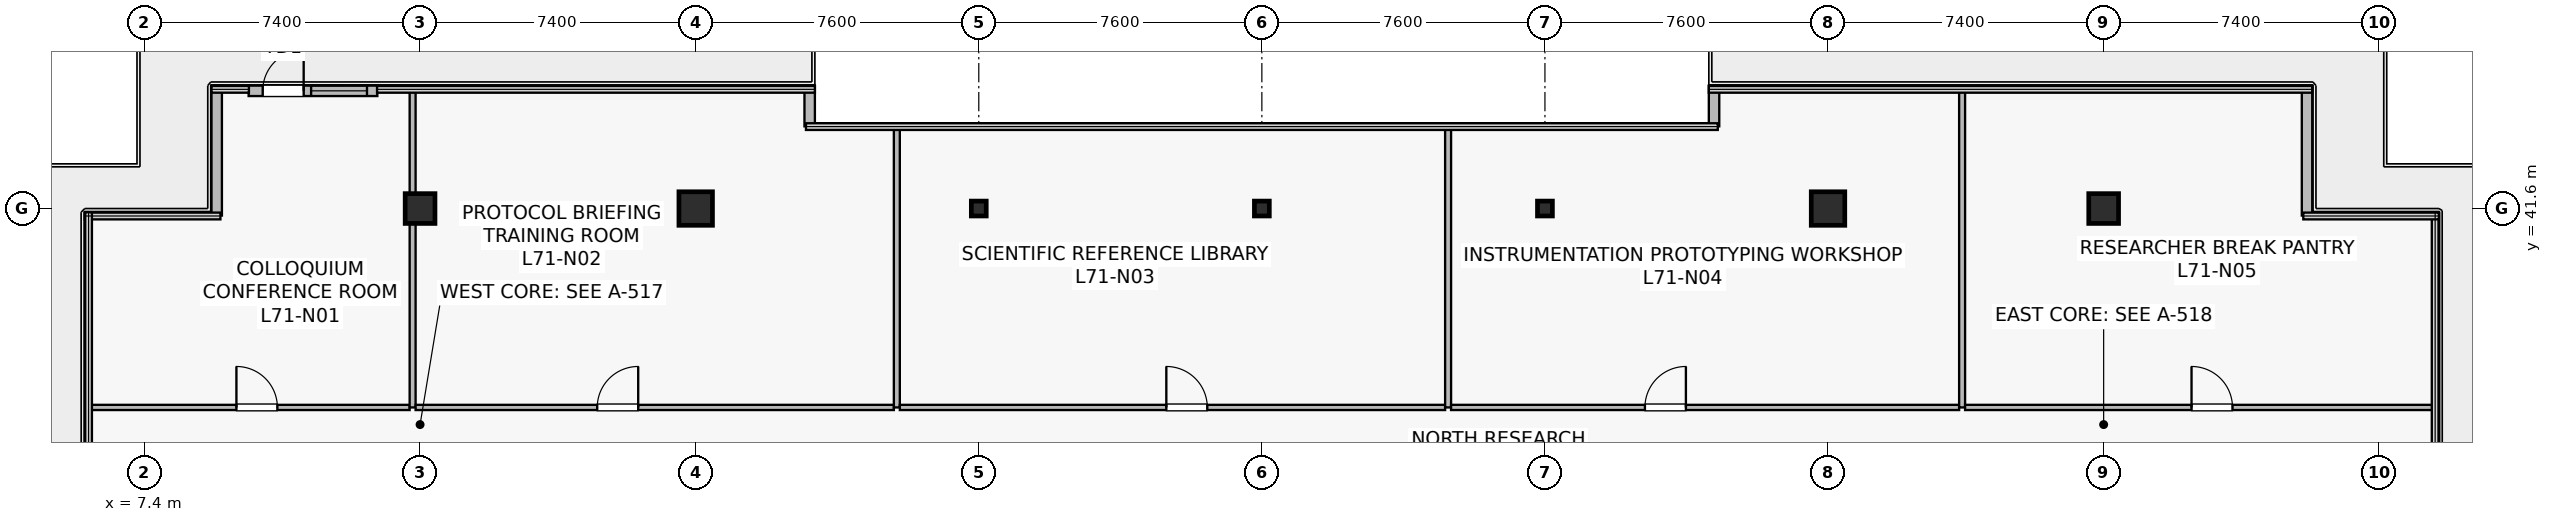
"""IFC4 building model, lengths in metres.
Left out: names, types, materials, properties, quantities, classifications, styles, units other than length and angle.
Written with IfcOpenShell. Run it as: python <this file> out.ifc"""

import sys

from ifc_helpers import new_model, si_unit, direction, frame, frame_2d, origin, origin_2d, place, context, subcontext, project, spatial, rectangle, i_section, extrude, source, transform, mapped, element, fill, save


model = new_model("IFC4")
c1 = context("Model", 3, precision=1e-05, world=origin(), true_north=direction((0.0, 1.0)))
c2 = subcontext(c1, "Body", "Model", "MODEL_VIEW")
j1 = project(units=[si_unit("LENGTHUNIT", "METRE"), si_unit("PLANEANGLEUNIT", "RADIAN")], contexts=[c1])
p1 = place(None, origin())
s1 = spatial("IfcSite", under=j1, at=p1, CompositionType="ELEMENT")
p2 = place(p1, origin())
s2 = spatial("IfcBuilding", under=s1, at=p2, CompositionType="ELEMENT")
p3 = place(p2, frame((0.0, 0.0, 297.6)))
s3 = spatial("IfcBuildingStorey", under=s2, at=p3, CompositionType="ELEMENT", Elevation=297.6)
m1 = source(origin(), c2, "Body", "SweptSolid", [
    extrude(rectangle(XDim=0.8, YDim=0.8, at=origin_2d()), origin(), (0.0, 0.0, 1.0), 4.2),
])
p4 = place(p3, frame((14.8, 41.6, 0.0), z_axis=(0.0, 0.0, 1.0), x_axis=(1.0, 0.0, 0.0)))
e1 = element("IfcColumn", 1, at=p4, inside=s3, PredefinedType="COLUMN", context=c2, shape_type="MappedRepresentation", body=[
    mapped(m1, transform((0.0, 0.0, 0.0), scale=1.0)),
])
m2 = source(origin(), c2, "Body", "SweptSolid", [
    extrude(rectangle(XDim=0.9, YDim=0.9, at=origin_2d()), origin(), (0.0, 0.0, 1.0), 4.2),
])
for number, where, z_axis, x_axis in (
    (2, (22.2, 41.6, 0.0), (0.0, 0.0, 1.0), (1.0, 0.0, 0.0)),
    (3, (52.6, 41.6, 0.0), (0.0, 0.0, 1.0), (1.0, 0.0, 0.0)),
):
    element("IfcColumn", number, at=place(p3, frame(where, z_axis=z_axis, x_axis=x_axis)), inside=s3, PredefinedType="COLUMN", context=c2, shape_type="MappedRepresentation", body=[
        mapped(m2, transform((0.0, 0.0, 0.0), scale=1.0)),
    ])
p5 = place(p3, frame((60.0, 41.6, 0.0), z_axis=(0.0, 0.0, 1.0), x_axis=(1.0, 0.0, 0.0)))
e4 = element("IfcColumn", 4, at=p5, inside=s3, PredefinedType="COLUMN", context=c2, shape_type="MappedRepresentation", body=[
    mapped(m1, transform((0.0, 0.0, 0.0), scale=1.0)),
])
m3 = source(origin(), c2, "Body", "SweptSolid", [
    extrude(i_section(OverallWidth=0.4, OverallDepth=0.4, WebThickness=0.021, FlangeThickness=0.021, at=origin_2d()), origin(), (0.0, 0.0, 1.0), 4.2),
])
for number, where, z_axis, x_axis in (
    (5, (29.8, 41.6, 0.0), (0.0, 0.0, 1.0), (1.0, 0.0, 0.0)),
    (6, (37.4, 41.6, 0.0), (0.0, 0.0, 1.0), (1.0, 0.0, 0.0)),
    (7, (45.0, 41.6, 0.0), (0.0, 0.0, 1.0), (1.0, 0.0, 0.0)),
):
    element("IfcColumn", number, at=place(p3, frame(where, z_axis=z_axis, x_axis=x_axis)), inside=s3, PredefinedType="COLUMN", context=c2, shape_type="MappedRepresentation", body=[
        mapped(m3, transform((0.0, 0.0, 0.0), scale=1.0)),
    ])
p6 = place(p3, frame((10.197, 44.76, 0.0), z_axis=(0.0, 0.0, 1.0), x_axis=(1.0, 0.0, 0.0)))
e8 = element("IfcWall", 8, at=p6, inside=s3, PredefinedType="STANDARD", context=c2, shape_type="SweptSolid", body=[
    extrude(rectangle(XDim=3.456, YDim=0.28, at=frame_2d((1.728, 0.0))), origin(), (0.0, 0.0, 1.0), 3.9),
])
p7 = place(p6, frame((0.378, 0.0, 0.0)))
e9 = element("IfcOpeningElement", 9, at=p7, cuts=e8, PredefinedType="OPENING", context=c2, shape_type="SweptSolid", body=[
    extrude(rectangle(XDim=1.1, YDim=2.2, at=frame_2d((0.55, 1.1))), frame((0.0, 0.15, 0.0), z_axis=(0.0, -1.0, 0.0), x_axis=(1.0, 0.0, 0.0)), (0.0, 0.0, 1.0), 0.3),
])
p8 = place(p6, frame((1.678, 0.0, 0.9)))
e10 = element("IfcOpeningElement", 10, at=p8, cuts=e8, PredefinedType="OPENING", context=c2, shape_type="SweptSolid", body=[
    extrude(rectangle(XDim=1.5, YDim=2.2, at=frame_2d((0.75, 1.1))), frame((0.0, 0.15, 0.0), z_axis=(0.0, -1.0, 0.0), x_axis=(1.0, 0.0, 0.0)), (0.0, 0.0, 1.0), 0.3),
])
p9 = place(p3, frame((65.46, 41.412, 0.0), z_axis=(0.0, 0.0, 1.0), x_axis=(0.0, 1.0, 0.0)))
e11 = element("IfcWall", 11, at=p9, inside=s3, PredefinedType="STANDARD", context=c2, shape_type="SweptSolid", body=[
    extrude(rectangle(XDim=3.488, YDim=0.28, at=frame_2d((1.744, 0.0))), origin(), (0.0, 0.0, 1.0), 3.9),
])
for number, where, z_axis, x_axis in (
    (12, (49.54, 44.9, 0.0), (0.0, 0.0, 1.0), (0.0, -1.0, 0.0)),
    (13, (25.26, 43.807, 0.0), (0.0, 0.0, 1.0), (0.0, 1.0, 0.0)),
):
    element("IfcWall", number, at=place(p3, frame(where, z_axis=z_axis, x_axis=x_axis)), inside=s3, PredefinedType="STANDARD", context=c2, shape_type="SweptSolid", body=[
        extrude(rectangle(XDim=1.093, YDim=0.28, at=frame_2d((0.546, 0.0))), origin(), (0.0, 0.0, 1.0), 3.9),
    ])
p10 = place(p3, frame((9.34, 44.9, 0.0), z_axis=(0.0, 0.0, 1.0), x_axis=(0.0, -1.0, 0.0)))
e14 = element("IfcWall", 14, at=p10, inside=s3, PredefinedType="STANDARD", context=c2, shape_type="SweptSolid", body=[
    extrude(rectangle(XDim=3.488, YDim=0.28, at=frame_2d((1.744, 0.0))), origin(), (0.0, 0.0, 1.0), 3.9),
])
p11 = place(p3, frame((5.91, 36.26, 0.0), z_axis=(0.0, 0.0, 1.0), x_axis=(1.0, 0.0, 0.0)))
e15 = element("IfcWall", 15, at=p11, inside=s3, PredefinedType="PARTITIONING", context=c2, shape_type="SweptSolid", body=[
    extrude(rectangle(XDim=8.61, YDim=0.14, at=frame_2d((4.305, 0.0))), origin(), (0.0, 0.0, 1.0), 3.9),
])
p12 = place(p11, frame((3.959, 0.0, 0.0)))
e16 = element("IfcOpeningElement", 16, at=p12, cuts=e15, PredefinedType="OPENING", context=c2, shape_type="SweptSolid", body=[
    extrude(rectangle(XDim=1.1, YDim=2.18, at=frame_2d((0.55, 1.09))), frame((0.0, 0.08, 0.0), z_axis=(0.0, -1.0, 0.0), x_axis=(1.0, 0.0, 0.0)), (0.0, 0.0, 1.0), 0.16),
])
p13 = place(p3, frame((14.6, 36.26, 0.0), z_axis=(0.0, 0.0, 1.0), x_axis=(0.0, 1.0, 0.0)))
e17 = element("IfcWall", 17, at=p13, inside=s3, PredefinedType="PARTITIONING", context=c2, shape_type="SweptSolid", body=[
    extrude(rectangle(XDim=8.53, YDim=0.16, at=frame_2d((4.265, 0.0))), origin(), (0.0, 0.0, 1.0), 3.297),
])
p14 = place(p3, frame((14.68, 36.26, 0.0), z_axis=(0.0, 0.0, 1.0), x_axis=(1.0, 0.0, 0.0)))
e18 = element("IfcWall", 18, at=p14, inside=s3, PredefinedType="PARTITIONING", context=c2, shape_type="SweptSolid", body=[
    extrude(rectangle(XDim=12.84, YDim=0.14, at=frame_2d((6.42, 0.0))), origin(), (0.0, 0.0, 1.0), 3.297),
])
p15 = place(p14, frame((4.876, 0.0, 0.0)))
e19 = element("IfcOpeningElement", 19, at=p15, cuts=e18, PredefinedType="OPENING", context=c2, shape_type="SweptSolid", body=[
    extrude(rectangle(XDim=1.1, YDim=2.18, at=frame_2d((0.55, 1.09))), frame((0.0, 0.08, 0.0), z_axis=(0.0, -1.0, 0.0), x_axis=(1.0, 0.0, 0.0)), (0.0, 0.0, 1.0), 0.16),
])
p16 = place(p3, frame((27.6, 36.26, 0.0), z_axis=(0.0, 0.0, 1.0), x_axis=(0.0, 1.0, 0.0)))
e20 = element("IfcWall", 20, at=p16, inside=s3, PredefinedType="PARTITIONING", context=c2, shape_type="SweptSolid", body=[
    extrude(rectangle(XDim=7.53, YDim=0.16, at=frame_2d((3.765, 0.0))), origin(), (0.0, 0.0, 1.0), 2.985),
])
p17 = place(p3, frame((27.68, 36.26, 0.0), z_axis=(0.0, 0.0, 1.0), x_axis=(1.0, 0.0, 0.0)))
e21 = element("IfcWall", 21, at=p17, inside=s3, PredefinedType="PARTITIONING", context=c2, shape_type="SweptSolid", body=[
    extrude(rectangle(XDim=14.64, YDim=0.14, at=frame_2d((7.32, 0.0))), origin(), (0.0, 0.0, 1.0), 3.297),
])
p18 = place(p17, frame((7.155, 0.0, 0.0)))
e22 = element("IfcOpeningElement", 22, at=p18, cuts=e21, PredefinedType="OPENING", context=c2, shape_type="SweptSolid", body=[
    extrude(rectangle(XDim=1.1, YDim=2.18, at=frame_2d((0.55, 1.09))), frame((0.0, 0.08, 0.0), z_axis=(0.0, -1.0, 0.0), x_axis=(1.0, 0.0, 0.0)), (0.0, 0.0, 1.0), 0.16),
])
p19 = place(p3, frame((42.4, 36.26, 0.0), z_axis=(0.0, 0.0, 1.0), x_axis=(0.0, 1.0, 0.0)))
e23 = element("IfcWall", 23, at=p19, inside=s3, PredefinedType="PARTITIONING", context=c2, shape_type="SweptSolid", body=[
    extrude(rectangle(XDim=7.53, YDim=0.16, at=frame_2d((3.765, 0.0))), origin(), (0.0, 0.0, 1.0), 2.985),
])
p20 = place(p3, frame((42.48, 36.26, 0.0), z_axis=(0.0, 0.0, 1.0), x_axis=(1.0, 0.0, 0.0)))
e24 = element("IfcWall", 24, at=p20, inside=s3, PredefinedType="PARTITIONING", context=c2, shape_type="SweptSolid", body=[
    extrude(rectangle(XDim=13.64, YDim=0.14, at=frame_2d((6.82, 0.0))), origin(), (0.0, 0.0, 1.0), 3.297),
])
p21 = place(p20, frame((5.204, 0.0, 0.0)))
e25 = element("IfcOpeningElement", 25, at=p21, cuts=e24, PredefinedType="OPENING", context=c2, shape_type="SweptSolid", body=[
    extrude(rectangle(XDim=1.1, YDim=2.18, at=frame_2d((0.55, 1.09))), frame((0.0, 0.08, 0.0), z_axis=(0.0, -1.0, 0.0), x_axis=(1.0, 0.0, 0.0)), (0.0, 0.0, 1.0), 0.16),
])
p22 = place(p3, frame((56.2, 36.26, 0.0), z_axis=(0.0, 0.0, 1.0), x_axis=(0.0, 1.0, 0.0)))
e26 = element("IfcWall", 26, at=p22, inside=s3, PredefinedType="PARTITIONING", context=c2, shape_type="SweptSolid", body=[
    extrude(rectangle(XDim=8.53, YDim=0.16, at=frame_2d((4.265, 0.0))), origin(), (0.0, 0.0, 1.0), 3.235),
])
p23 = place(p3, frame((56.28, 36.26, 0.0), z_axis=(0.0, 0.0, 1.0), x_axis=(1.0, 0.0, 0.0)))
e27 = element("IfcWall", 27, at=p23, inside=s3, PredefinedType="PARTITIONING", context=c2, shape_type="SweptSolid", body=[
    extrude(rectangle(XDim=12.61, YDim=0.14, at=frame_2d((6.305, 0.0))), origin(), (0.0, 0.0, 1.0), 3.297),
])
p24 = place(p23, frame((6.079, 0.0, 0.0)))
e28 = element("IfcOpeningElement", 28, at=p24, cuts=e27, PredefinedType="OPENING", context=c2, shape_type="SweptSolid", body=[
    extrude(rectangle(XDim=1.1, YDim=2.18, at=frame_2d((0.55, 1.09))), frame((0.0, 0.08, 0.0), z_axis=(0.0, -1.0, 0.0), x_axis=(1.0, 0.0, 0.0)), (0.0, 0.0, 1.0), 0.16),
])
m4 = source(origin(), c2, "Body", "SweptSolid", [
    extrude(rectangle(XDim=1.1, YDim=2.2, at=frame_2d((0.55, 1.1))), frame((0.0, 0.025, 0.0), z_axis=(0.0, -1.0, 0.0), x_axis=(1.0, 0.0, 0.0)), (0.0, 0.0, 1.0), 0.05),
])
p25 = place(p7, origin())
e29 = element("IfcDoor", 29, at=p25, inside=s3, OperationType="SINGLE_SWING_RIGHT", PredefinedType="DOOR", context=c2, shape_type="MappedRepresentation", body=[
    mapped(m4, transform((0.0, 0.0, 0.0), scale=1.0)),
])
fill(e9, e29)
m5 = source(origin(), c2, "Body", "SweptSolid", [
    extrude(rectangle(XDim=1.5, YDim=2.2, at=frame_2d((0.75, 1.1))), frame((0.0, 0.03, 0.0), z_axis=(0.0, -1.0, 0.0), x_axis=(1.0, 0.0, 0.0)), (0.0, 0.0, 1.0), 0.06),
])
p26 = place(p8, origin())
e30 = element("IfcWindow", 30, at=p26, inside=s3, PartitioningType="SINGLE_PANEL", PredefinedType="WINDOW", context=c2, shape_type="MappedRepresentation", body=[
    mapped(m5, transform((0.0, 0.0, 0.0), scale=1.0)),
])
fill(e10, e30)
m6 = source(origin(), c2, "Body", "SweptSolid", [
    extrude(rectangle(XDim=1.1, YDim=2.18, at=frame_2d((0.55, 1.09))), frame((0.0, 0.025, 0.0), z_axis=(0.0, -1.0, 0.0), x_axis=(1.0, 0.0, 0.0)), (0.0, 0.0, 1.0), 0.05),
])
p27 = place(p12, origin())
e31 = element("IfcDoor", 31, at=p27, inside=s3, OperationType="SINGLE_SWING_LEFT", PredefinedType="DOOR", context=c2, shape_type="MappedRepresentation", body=[
    mapped(m6, transform((0.0, 0.0, 0.0), scale=1.0)),
])
fill(e16, e31)
p28 = place(p15, origin())
e32 = element("IfcDoor", 32, at=p28, inside=s3, OperationType="SINGLE_SWING_RIGHT", PredefinedType="DOOR", context=c2, shape_type="MappedRepresentation", body=[
    mapped(m6, transform((0.0, 0.0, 0.0), scale=1.0)),
])
fill(e19, e32)
p29 = place(p18, origin())
e33 = element("IfcDoor", 33, at=p29, inside=s3, OperationType="SINGLE_SWING_LEFT", PredefinedType="DOOR", context=c2, shape_type="MappedRepresentation", body=[
    mapped(m6, transform((0.0, 0.0, 0.0), scale=1.0)),
])
fill(e22, e33)
p30 = place(p21, origin())
e34 = element("IfcDoor", 34, at=p30, inside=s3, OperationType="SINGLE_SWING_RIGHT", PredefinedType="DOOR", context=c2, shape_type="MappedRepresentation", body=[
    mapped(m6, transform((0.0, 0.0, 0.0), scale=1.0)),
])
fill(e25, e34)
p31 = place(p24, origin())
e35 = element("IfcDoor", 35, at=p31, inside=s3, OperationType="SINGLE_SWING_LEFT", PredefinedType="DOOR", context=c2, shape_type="MappedRepresentation", body=[
    mapped(m6, transform((0.0, 0.0, 0.0), scale=1.0)),
])
fill(e28, e35)
save(model, sys.argv[1])
